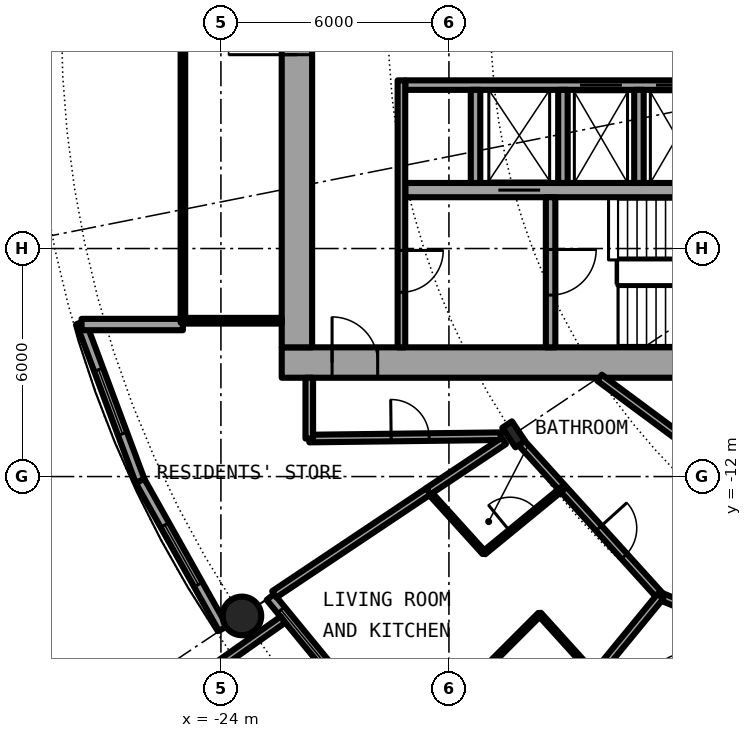
"""IFC4 building model, lengths in metres.
Left out: names, types, materials, properties, quantities, classifications, styles, units other than length and angle.
Written with IfcOpenShell. Run it as: python <this file> out.ifc"""

import sys

from ifc_helpers import new_model, si_unit, direction, frame, frame_2d, origin, origin_2d, place, context, subcontext, project, spatial, rectangle, hollow_circle, i_section, extrude, element, fill, save


model = new_model("IFC4")
c1 = context("Model", 3, precision=1e-05, world=origin(), true_north=direction((0.0, 1.0)))
c2 = subcontext(c1, "Body", "Model", "MODEL_VIEW")
j1 = project(units=[si_unit("LENGTHUNIT", "METRE"), si_unit("PLANEANGLEUNIT", "RADIAN")], contexts=[c1])
p1 = place(None, origin())
s1 = spatial("IfcSite", under=j1, at=p1, CompositionType="ELEMENT")
p2 = place(p1, origin())
s2 = spatial("IfcBuilding", under=s1, at=p2, CompositionType="ELEMENT")
p3 = place(p2, frame((0.0, 0.0, 47.2)))
s3 = spatial("IfcBuildingStorey", under=s2, at=p3, CompositionType="ELEMENT", Elevation=47.2)
p4 = place(p3, frame((-23.448, -15.667, 0.0), z_axis=(0.0, 0.0, 1.0), x_axis=(1.0, 0.0, 0.0)))
e1 = element("IfcColumn", 1, at=p4, inside=s3, PredefinedType="COLUMN", context=c2, shape_type="SweptSolid", body=[
    extrude(hollow_circle(Radius=0.508, WallThickness=0.05, at=origin_2d()), origin(), (0.0, 0.0, 1.0), 3.05),
])
p5 = place(p3, frame((-16.297, -10.889, 0.0), z_axis=(0.0, 0.0, 1.0), x_axis=(-0.831469612303, -0.55557023302, 0.0)))
e2 = element("IfcColumn", 2, at=p5, inside=s3, PredefinedType="COLUMN", context=c2, shape_type="SweptSolid", body=[
    extrude(i_section(OverallWidth=0.305, OverallDepth=0.62, WebThickness=0.021, FlangeThickness=0.04, FilletRadius=0.027, at=origin_2d()), origin(), (0.0, 0.0, 1.0), 3.05),
])
p6 = place(p3, frame((-22.699, -15.167, 0.0), z_axis=(0.0, 0.0, 1.0), x_axis=(0.634382322723, -0.773019449054, 0.0)))
e3 = element("IfcWall", 3, at=p6, inside=s3, PredefinedType="SOLIDWALL", context=c2, shape_type="SweptSolid", body=[
    extrude(rectangle(XDim=5.352, YDim=0.25, at=frame_2d((2.676, 0.0))), origin(), (0.0, 0.0, 1.0), 2.7),
])
p7 = place(p6, frame((0.441, 0.0, 0.3)))
e4 = element("IfcOpeningElement", 4, at=p7, cuts=e3, PredefinedType="OPENING", context=c2, shape_type="SweptSolid", body=[
    extrude(rectangle(XDim=1.8, YDim=2.1, at=frame_2d((0.9, 1.05))), frame((0.0, 0.135, 0.0), z_axis=(0.0, -1.0, 0.0), x_axis=(1.0, 0.0, 0.0)), (0.0, 0.0, 1.0), 0.27),
])
p8 = place(p6, frame((3.51, 0.0, 0.0)))
e5 = element("IfcOpeningElement", 5, at=p8, cuts=e3, PredefinedType="OPENING", context=c2, shape_type="SweptSolid", body=[
    extrude(rectangle(XDim=1.0, YDim=2.2, at=frame_2d((0.5, 1.1))), frame((0.0, 0.135, 0.0), z_axis=(0.0, -1.0, 0.0), x_axis=(1.0, 0.0, 0.0)), (0.0, 0.0, 1.0), 0.27),
])
p9 = place(p3, frame((-22.37, -15.765, -0.03), z_axis=(0.0, 0.0, 1.0), x_axis=(-0.817256123454, -0.576274612209, 0.0)))
e6 = element("IfcWall", 6, at=p9, inside=s3, PredefinedType="SOLIDWALL", context=c2, shape_type="SweptSolid", body=[
    extrude(rectangle(XDim=2.933, YDim=0.2, at=frame_2d((1.466, 0.0))), origin(), (0.0, 0.0, 1.0), 2.73),
])
p10 = place(p3, frame((-27.682, -7.945, 0.0), z_axis=(0.0, 0.0, 1.0), x_axis=(0.349247811493, -0.937030397675, 0.0)))
e7 = element("IfcWall", 7, at=p10, inside=s3, PredefinedType="SOLIDWALL", context=c2, shape_type="SweptSolid", body=[
    extrude(rectangle(XDim=4.452, YDim=0.25, at=frame_2d((2.226, 0.0))), origin(), (0.0, 0.0, 1.0), 2.7),
])
p11 = place(p10, frame((1.327, 0.0, 0.3)))
e8 = element("IfcOpeningElement", 8, at=p11, cuts=e7, PredefinedType="OPENING", context=c2, shape_type="SweptSolid", body=[
    extrude(rectangle(XDim=1.8, YDim=2.1, at=frame_2d((0.9, 1.05))), frame((0.0, 0.135, 0.0), z_axis=(0.0, -1.0, 0.0), x_axis=(1.0, 0.0, 0.0)), (0.0, 0.0, 1.0), 0.27),
])
p12 = place(p3, frame((-26.127, -12.117, 0.0), z_axis=(0.0, 0.0, 1.0), x_axis=(0.489696356642, -0.871893042919, 0.0)))
e9 = element("IfcWall", 9, at=p12, inside=s3, PredefinedType="SOLIDWALL", context=c2, shape_type="SweptSolid", body=[
    extrude(rectangle(XDim=4.454, YDim=0.25, at=frame_2d((2.227, 0.0))), origin(), (0.0, 0.0, 1.0), 2.7),
])
p13 = place(p12, frame((1.327, 0.0, 0.3)))
e10 = element("IfcOpeningElement", 10, at=p13, cuts=e9, PredefinedType="OPENING", context=c2, shape_type="SweptSolid", body=[
    extrude(rectangle(XDim=1.8, YDim=2.1, at=frame_2d((0.9, 1.05))), frame((0.0, 0.135, 0.0), z_axis=(0.0, -1.0, 0.0), x_axis=(1.0, 0.0, 0.0)), (0.0, 0.0, 1.0), 0.27),
])
p14 = place(p3, frame((-25.0, -8.0, 0.0), z_axis=(0.0, 0.0, 1.0), x_axis=(-1.0, 0.0, 0.0)))
e11 = element("IfcWall", 11, at=p14, inside=s3, PredefinedType="SOLIDWALL", context=c2, shape_type="SweptSolid", body=[
    extrude(rectangle(XDim=2.667, YDim=0.3, at=frame_2d((1.333, 0.0))), origin(), (0.0, 0.0, 1.0), 2.7),
])
p15 = place(p3, frame((-22.4, -9.0, 0.0), z_axis=(0.0, 0.0, 1.0), x_axis=(1.0, 0.0, 0.0)))
e12 = element("IfcWall", 12, at=p15, inside=s3, PredefinedType="SHEAR", context=c2, shape_type="SweptSolid", body=[
    extrude(rectangle(XDim=14.2, YDim=0.8, at=frame_2d((7.1, 0.0))), origin(), (0.0, 0.0, 1.0), 3.05),
])
p16 = place(p15, frame((1.325, 0.0, 0.0)))
e13 = element("IfcOpeningElement", 13, at=p16, cuts=e12, PredefinedType="OPENING", context=c2, shape_type="SweptSolid", body=[
    extrude(rectangle(XDim=1.2, YDim=2.3, at=frame_2d((0.6, 1.15))), frame((0.0, 0.41, 0.0), z_axis=(0.0, -1.0, 0.0), x_axis=(1.0, 0.0, 0.0)), (0.0, 0.0, 1.0), 0.82),
])
p17 = place(p3, frame((-22.0, -8.6, 0.0), z_axis=(0.0, 0.0, 1.0), x_axis=(0.0, 1.0, 0.0)))
e14 = element("IfcWall", 14, at=p17, inside=s3, PredefinedType="SHEAR", context=c2, shape_type="SweptSolid", body=[
    extrude(rectangle(XDim=17.2, YDim=0.8, at=frame_2d((8.6, 0.0))), origin(), (0.0, 0.0, 1.0), 3.05),
])
p18 = place(p17, frame((7.7, 0.0, 0.0)))
e15 = element("IfcOpeningElement", 15, at=p18, cuts=e14, PredefinedType="OPENING", context=c2, shape_type="SweptSolid", body=[
    extrude(rectangle(XDim=1.8, YDim=2.3, at=frame_2d((0.9, 1.15))), frame((0.0, 0.41, 0.0), z_axis=(0.0, -1.0, 0.0), x_axis=(1.0, 0.0, 0.0)), (0.0, 0.0, 1.0), 0.82),
])
p19 = place(p3, frame((-9.0, -1.7, 0.0), z_axis=(0.0, 0.0, 1.0), x_axis=(-1.0, 0.0, 0.0)))
e16 = element("IfcWall", 16, at=p19, inside=s3, PredefinedType="SHEAR", context=c2, shape_type="SweptSolid", body=[
    extrude(rectangle(XDim=10.15, YDim=0.25, at=frame_2d((5.075, 0.0))), origin(), (0.0, 0.0, 1.0), 3.05),
])
p20 = place(p19, frame((0.387, 0.0, 0.0)))
e17 = element("IfcOpeningElement", 17, at=p20, cuts=e16, PredefinedType="OPENING", context=c2, shape_type="SweptSolid", body=[
    extrude(rectangle(XDim=1.1, YDim=2.3, at=frame_2d((0.55, 1.15))), frame((0.0, 0.135, 0.0), z_axis=(0.0, -1.0, 0.0), x_axis=(1.0, 0.0, 0.0)), (0.0, 0.0, 1.0), 0.27),
])
p21 = place(p19, frame((2.45, 0.0, 0.0)))
e18 = element("IfcOpeningElement", 18, at=p21, cuts=e16, PredefinedType="OPENING", context=c2, shape_type="SweptSolid", body=[
    extrude(rectangle(XDim=1.1, YDim=2.3, at=frame_2d((0.55, 1.15))), frame((0.0, 0.135, 0.0), z_axis=(0.0, -1.0, 0.0), x_axis=(1.0, 0.0, 0.0)), (0.0, 0.0, 1.0), 0.27),
])
p22 = place(p19, frame((4.45, 0.0, 0.0)))
e19 = element("IfcOpeningElement", 19, at=p22, cuts=e16, PredefinedType="OPENING", context=c2, shape_type="SweptSolid", body=[
    extrude(rectangle(XDim=1.1, YDim=2.3, at=frame_2d((0.55, 1.15))), frame((0.0, 0.135, 0.0), z_axis=(0.0, -1.0, 0.0), x_axis=(1.0, 0.0, 0.0)), (0.0, 0.0, 1.0), 0.27),
])
p23 = place(p3, frame((-9.0, -4.462, 0.0), z_axis=(0.0, 0.0, 1.0), x_axis=(-1.0, 0.0, 0.0)))
e20 = element("IfcWall", 20, at=p23, inside=s3, PredefinedType="SHEAR", context=c2, shape_type="SweptSolid", body=[
    extrude(rectangle(XDim=10.15, YDim=0.375, at=frame_2d((5.075, 0.0))), origin(), (0.0, 0.0, 1.0), 3.05),
])
p24 = place(p23, frame((6.6, 0.0, 0.0)))
e21 = element("IfcOpeningElement", 21, at=p24, cuts=e20, PredefinedType="OPENING", context=c2, shape_type="SweptSolid", body=[
    extrude(rectangle(XDim=1.1, YDim=2.3, at=frame_2d((0.55, 1.15))), frame((0.0, 0.198, 0.0), z_axis=(0.0, -1.0, 0.0), x_axis=(1.0, 0.0, 0.0)), (0.0, 0.0, 1.0), 0.395),
])
p25 = place(p3, frame((-15.325, -4.65, 0.0), z_axis=(0.0, 0.0, 1.0), x_axis=(0.0, -1.0, 0.0)))
e22 = element("IfcWall", 22, at=p25, inside=s3, PredefinedType="SHEAR", context=c2, shape_type="SweptSolid", body=[
    extrude(rectangle(XDim=3.95, YDim=0.25, at=frame_2d((1.975, 0.0))), origin(), (0.0, 0.0, 1.0), 3.05),
])
p26 = place(p25, frame((1.375, 0.0, 0.0)))
e23 = element("IfcOpeningElement", 23, at=p26, cuts=e22, PredefinedType="OPENING", context=c2, shape_type="SweptSolid", body=[
    extrude(rectangle(XDim=1.2, YDim=2.3, at=frame_2d((0.6, 1.15))), frame((0.0, 0.135, 0.0), z_axis=(0.0, -1.0, 0.0), x_axis=(1.0, 0.0, 0.0)), (0.0, 0.0, 1.0), 0.27),
])
for number, where, z_axis, x_axis in (
    (24, (-15.0, -1.825, 0.0), (0.0, 0.0, 1.0), (0.0, -1.0, 0.0)),
    (25, (-17.3, -1.825, 0.0), (0.0, 0.0, 1.0), (0.0, -1.0, 0.0)),
):
    element("IfcWall", number, at=place(p3, frame(where, z_axis=z_axis, x_axis=x_axis)), inside=s3, PredefinedType="SOLIDWALL", context=c2, shape_type="SweptSolid", body=[
        extrude(rectangle(XDim=2.45, YDim=0.25, at=frame_2d((1.225, 0.0))), origin(), (0.0, 0.0, 1.0), 2.7),
    ])
p27 = place(p3, frame((-19.25, -1.575, 0.0), z_axis=(0.0, 0.0, 1.0), x_axis=(0.0, -1.0, 0.0)))
e26 = element("IfcWall", 26, at=p27, inside=s3, PredefinedType="SOLIDWALL", context=c2, shape_type="SweptSolid", body=[
    extrude(rectangle(XDim=7.025, YDim=0.2, at=frame_2d((3.513, 0.0))), origin(), (0.0, 0.0, 1.0), 2.7),
])
p28 = place(p27, frame((4.475, 0.0, 0.0)))
e27 = element("IfcOpeningElement", 27, at=p28, cuts=e26, PredefinedType="OPENING", context=c2, shape_type="SweptSolid", body=[
    extrude(rectangle(XDim=1.1, YDim=2.3, at=frame_2d((0.55, 1.15))), frame((0.0, 0.11, 0.0), z_axis=(0.0, -1.0, 0.0), x_axis=(1.0, 0.0, 0.0)), (0.0, 0.0, 1.0), 0.22),
])
p29 = place(p3, frame((-13.0, -1.825, 0.0), z_axis=(0.0, 0.0, 1.0), x_axis=(0.0, -1.0, 0.0)))
e28 = element("IfcWall", 28, at=p29, inside=s3, PredefinedType="SOLIDWALL", context=c2, shape_type="SweptSolid", body=[
    extrude(rectangle(XDim=2.45, YDim=0.25, at=frame_2d((1.225, 0.0))), origin(), (0.0, 0.0, 1.0), 2.7),
])
p30 = place(p3, frame((-22.4, -7.9, 0.0), z_axis=(0.0, 0.0, 1.0), x_axis=(-1.0, 0.0, 0.0)))
e29 = element("IfcWall", 29, at=p30, inside=s3, PredefinedType="PARTITIONING", context=c2, shape_type="SweptSolid", body=[
    extrude(rectangle(XDim=2.54, YDim=0.15, at=frame_2d((1.27, 0.0))), origin(), (0.0, 0.0, 1.0), 2.7),
])
p31 = place(p3, frame((-25.0, 7.95, 0.0), z_axis=(0.0, 0.0, 1.0), x_axis=(0.0, -1.0, 0.0)))
e30 = element("IfcWall", 30, at=p31, inside=s3, PredefinedType="PARTITIONING", context=c2, shape_type="SweptSolid", body=[
    extrude(rectangle(XDim=15.9, YDim=0.12, at=frame_2d((7.95, 0.0))), origin(), (0.0, 0.0, 1.0), 2.7),
])
p32 = place(p31, frame((0.95, 0.0, 0.1)))
e31 = element("IfcOpeningElement", 31, at=p32, cuts=e30, PredefinedType="OPENING", context=c2, shape_type="SweptSolid", body=[
    extrude(rectangle(XDim=14.0, YDim=2.35, at=frame_2d((7.0, 1.175))), frame((0.0, 0.07, 0.0), z_axis=(0.0, -1.0, 0.0), x_axis=(1.0, 0.0, 0.0)), (0.0, 0.0, 1.0), 0.14),
])
p33 = place(p3, frame((-18.542, -12.389, 0.0), z_axis=(0.0, 0.0, 1.0), x_axis=(0.671396556615, -0.741098282123, 0.0)))
e32 = element("IfcWall", 32, at=p33, inside=s3, PredefinedType="PARTITIONING", context=c2, shape_type="SweptSolid", body=[
    extrude(rectangle(XDim=2.182, YDim=0.1, at=frame_2d((1.091, 0.0))), origin(), (0.0, 0.0, 1.0), 2.7),
])
p34 = place(p3, frame((-15.617, -15.617, 0.0), z_axis=(0.0, 0.0, 1.0), x_axis=(0.671144831591, -0.741326254107, 0.0)))
e33 = element("IfcWall", 33, at=p34, inside=s3, PredefinedType="PARTITIONING", context=c2, shape_type="SweptSolid", body=[
    extrude(rectangle(XDim=2.181, YDim=0.1, at=frame_2d((1.091, 0.0))), origin(), (0.0, 0.0, 1.0), 2.7),
])
p35 = place(p3, frame((-16.193, -11.003, 0.0), z_axis=(0.0, 0.0, 1.0), x_axis=(0.671514934772, -0.740991020444, 0.0)))
e34 = element("IfcWall", 34, at=p35, inside=s3, PredefinedType="PARTITIONING", context=c2, shape_type="SweptSolid", body=[
    extrude(rectangle(XDim=5.598, YDim=0.2, at=frame_2d((2.799, 0.0))), origin(), (0.0, 0.0, 1.0), 2.38),
])
p36 = place(p35, frame((3.18, 0.0, 0.0)))
e35 = element("IfcOpeningElement", 35, at=p36, cuts=e34, PredefinedType="OPENING", context=c2, shape_type="SweptSolid", body=[
    extrude(rectangle(XDim=1.0, YDim=2.3, at=frame_2d((0.5, 1.15))), frame((0.0, 0.11, 0.0), z_axis=(0.0, -1.0, 0.0), x_axis=(1.0, 0.0, 0.0)), (0.0, 0.0, 1.0), 0.22),
])
p37 = place(p3, frame((-12.434, -15.151, 0.0), z_axis=(0.0, 0.0, 1.0), x_axis=(0.923888467236, -0.382661861319, 0.0)))
e36 = element("IfcWall", 36, at=p37, inside=s3, PredefinedType="PARTITIONING", context=c2, shape_type="SweptSolid", body=[
    extrude(rectangle(XDim=11.381, YDim=0.2, at=frame_2d((5.691, 0.0))), origin(), (0.0, 0.0, 1.0), 2.7),
])
p38 = place(p37, frame((3.292, 0.0, 0.0)))
e37 = element("IfcOpeningElement", 37, at=p38, cuts=e36, PredefinedType="OPENING", context=c2, shape_type="SweptSolid", body=[
    extrude(rectangle(XDim=1.0, YDim=2.3, at=frame_2d((0.5, 1.15))), frame((0.0, 0.11, 0.0), z_axis=(0.0, -1.0, 0.0), x_axis=(1.0, 0.0, 0.0)), (0.0, 0.0, 1.0), 0.22),
])
p39 = place(p3, frame((-14.037, -9.4, 0.0), z_axis=(0.0, 0.0, 1.0), x_axis=(0.803202106898, -0.595706618626, 0.0)))
e38 = element("IfcWall", 38, at=p39, inside=s3, PredefinedType="PARTITIONING", context=c2, shape_type="SweptSolid", body=[
    extrude(rectangle(XDim=11.368, YDim=0.2, at=frame_2d((5.684, 0.0))), origin(), (0.0, 0.0, 1.0), 2.7),
])
p40 = place(p39, frame((5.988, 0.0, 0.0)))
e39 = element("IfcOpeningElement", 39, at=p40, cuts=e38, PredefinedType="OPENING", context=c2, shape_type="SweptSolid", body=[
    extrude(rectangle(XDim=1.0, YDim=2.3, at=frame_2d((0.5, 1.15))), frame((0.0, 0.11, 0.0), z_axis=(0.0, -1.0, 0.0), x_axis=(1.0, 0.0, 0.0)), (0.0, 0.0, 1.0), 0.22),
])
p41 = place(p3, frame((-21.675, -11.0, 0.0), z_axis=(0.0, 0.0, 1.0), x_axis=(0.99992425795, 0.012307654658, 0.0)))
e40 = element("IfcWall", 40, at=p41, inside=s3, PredefinedType="PARTITIONING", context=c2, shape_type="SweptSolid", body=[
    extrude(rectangle(XDim=5.039, YDim=0.2, at=frame_2d((2.519, 0.0))), origin(), (0.0, 0.0, 1.0), 2.7),
])
p42 = place(p41, frame((2.155, 0.0, 0.0)))
e41 = element("IfcOpeningElement", 41, at=p42, cuts=e40, PredefinedType="OPENING", context=c2, shape_type="SweptSolid", body=[
    extrude(rectangle(XDim=1.0, YDim=2.3, at=frame_2d((0.5, 1.15))), frame((0.0, 0.11, 0.0), z_axis=(0.0, -1.0, 0.0), x_axis=(1.0, 0.0, 0.0)), (0.0, 0.0, 1.0), 0.22),
])
p43 = place(p3, frame((-18.544, -12.387, 0.0), z_axis=(0.0, 0.0, 1.0), x_axis=(0.832066006555, 0.554676627176, 0.0)))
e42 = element("IfcWall", 42, at=p43, inside=s3, PredefinedType="PARTITIONING", context=c2, shape_type="SweptSolid", body=[
    extrude(rectangle(XDim=2.39, YDim=0.2, at=frame_2d((1.195, 0.0))), origin(), (0.0, 0.0, 1.0), 2.7),
])
p44 = place(p3, frame((-22.595, -15.098, 0.0), z_axis=(0.0, 0.0, 1.0), x_axis=(0.831387096605, 0.55569370664, 0.0)))
e43 = element("IfcWall", 43, at=p44, inside=s3, PredefinedType="PARTITIONING", context=c2, shape_type="SweptSolid", body=[
    extrude(rectangle(XDim=4.875, YDim=0.2, at=frame_2d((2.438, 0.0))), origin(), (0.0, 0.0, 1.0), 2.7),
])
p45 = place(p3, frame((-19.21, -19.222, 0.0), z_axis=(0.0, 0.0, 1.0), x_axis=(0.706914880313, 0.707298629994, 0.0)))
e44 = element("IfcWall", 44, at=p45, inside=s3, PredefinedType="PARTITIONING", context=c2, shape_type="SweptSolid", body=[
    extrude(rectangle(XDim=5.09, YDim=0.1, at=frame_2d((2.545, 0.0))), origin(), (0.0, 0.0, 1.0), 2.7),
])
p46 = place(p45, frame((2.095, 0.0, 0.0)))
e45 = element("IfcOpeningElement", 45, at=p46, cuts=e44, PredefinedType="OPENING", context=c2, shape_type="SweptSolid", body=[
    extrude(rectangle(XDim=0.9, YDim=2.3, at=frame_2d((0.45, 1.15))), frame((0.0, 0.06, 0.0), z_axis=(0.0, -1.0, 0.0), x_axis=(1.0, 0.0, 0.0)), (0.0, 0.0, 1.0), 0.12),
])
p47 = place(p3, frame((-17.241, -21.006, 0.0), z_axis=(0.0, 0.0, 1.0), x_axis=(0.634381303318, 0.773020285633, 0.0)))
e46 = element("IfcWall", 46, at=p47, inside=s3, PredefinedType="PARTITIONING", context=c2, shape_type="SweptSolid", body=[
    extrude(rectangle(XDim=7.576, YDim=0.2, at=frame_2d((3.788, 0.0))), origin(), (0.0, 0.0, 1.0), 2.7),
])
p48 = place(p3, frame((-17.077, -14.006, 0.0), z_axis=(0.0, 0.0, 1.0), x_axis=(0.77319617123, 0.634166918717, 0.0)))
e47 = element("IfcWall", 47, at=p48, inside=s3, PredefinedType="PARTITIONING", context=c2, shape_type="SweptSolid", body=[
    extrude(rectangle(XDim=2.675, YDim=0.1, at=frame_2d((1.337, 0.0))), origin(), (0.0, 0.0, 1.0), 2.7),
])
p49 = place(p48, frame((0.887, 0.0, 0.0)))
e48 = element("IfcOpeningElement", 48, at=p49, cuts=e47, PredefinedType="OPENING", context=c2, shape_type="SweptSolid", body=[
    extrude(rectangle(XDim=0.9, YDim=2.3, at=frame_2d((0.45, 1.15))), frame((0.0, 0.06, 0.0), z_axis=(0.0, -1.0, 0.0), x_axis=(1.0, 0.0, 0.0)), (0.0, 0.0, 1.0), 0.12),
])
p50 = place(p3, frame((-12.153, -18.064, 0.0), z_axis=(0.0, 0.0, 1.0), x_axis=(0.558084773293, 0.829783939239, 0.0)))
e49 = element("IfcWall", 49, at=p50, inside=s3, PredefinedType="PARTITIONING", context=c2, shape_type="SweptSolid", body=[
    extrude(rectangle(XDim=1.862, YDim=0.1, at=frame_2d((0.931, 0.0))), origin(), (0.0, 0.0, 1.0), 2.7),
])
p51 = place(p50, frame((0.6, 0.0, 0.0)))
e50 = element("IfcOpeningElement", 50, at=p51, cuts=e49, PredefinedType="OPENING", context=c2, shape_type="SweptSolid", body=[
    extrude(rectangle(XDim=0.9, YDim=2.3, at=frame_2d((0.45, 1.15))), frame((0.0, 0.06, 0.0), z_axis=(0.0, -1.0, 0.0), x_axis=(1.0, 0.0, 0.0)), (0.0, 0.0, 1.0), 0.12),
])
p52 = place(p3, frame((-21.675, -11.0, 0.0), z_axis=(0.0, 0.0, 1.0), x_axis=(0.0, 1.0, 0.0)))
e51 = element("IfcWall", 51, at=p52, inside=s3, PredefinedType="PARTITIONING", context=c2, shape_type="SweptSolid", body=[
    extrude(rectangle(XDim=1.6, YDim=0.2, at=frame_2d((0.8, 0.0))), origin(), (0.0, 0.0, 1.0), 2.7),
])
p53 = place(p7, origin())
e52 = element("IfcWindow", 52, at=p53, inside=s3, PartitioningType="SINGLE_PANEL", PredefinedType="WINDOW", context=c2, shape_type="SweptSolid", body=[
    extrude(rectangle(XDim=1.8, YDim=2.1, at=frame_2d((0.9, 1.05))), frame((0.0, 0.03, 0.0), z_axis=(0.0, -1.0, 0.0), x_axis=(1.0, 0.0, 0.0)), (0.0, 0.0, 1.0), 0.06),
])
fill(e4, e52)
p54 = place(p11, origin())
e53 = element("IfcWindow", 53, at=p54, inside=s3, PartitioningType="SINGLE_PANEL", PredefinedType="WINDOW", context=c2, shape_type="SweptSolid", body=[
    extrude(rectangle(XDim=1.8, YDim=2.1, at=frame_2d((0.9, 1.05))), frame((0.0, 0.03, 0.0), z_axis=(0.0, -1.0, 0.0), x_axis=(1.0, 0.0, 0.0)), (0.0, 0.0, 1.0), 0.06),
])
fill(e8, e53)
p55 = place(p13, origin())
e54 = element("IfcWindow", 54, at=p55, inside=s3, PartitioningType="SINGLE_PANEL", PredefinedType="WINDOW", context=c2, shape_type="SweptSolid", body=[
    extrude(rectangle(XDim=1.8, YDim=2.1, at=frame_2d((0.9, 1.05))), frame((0.0, 0.03, 0.0), z_axis=(0.0, -1.0, 0.0), x_axis=(1.0, 0.0, 0.0)), (0.0, 0.0, 1.0), 0.06),
])
fill(e10, e54)
p56 = place(p21, origin())
e55 = element("IfcDoor", 55, at=p56, inside=s3, OperationType="DOUBLE_DOOR_SLIDING", PredefinedType="DOOR", context=c2, shape_type="SweptSolid", body=[
    extrude(rectangle(XDim=1.1, YDim=2.3, at=frame_2d((0.55, 1.15))), frame((0.0, 0.025, 0.0), z_axis=(0.0, -1.0, 0.0), x_axis=(1.0, 0.0, 0.0)), (0.0, 0.0, 1.0), 0.05),
])
fill(e18, e55)
p57 = place(p22, origin())
e56 = element("IfcDoor", 56, at=p57, inside=s3, OperationType="DOUBLE_DOOR_SLIDING", PredefinedType="DOOR", context=c2, shape_type="SweptSolid", body=[
    extrude(rectangle(XDim=1.1, YDim=2.3, at=frame_2d((0.55, 1.15))), frame((0.0, 0.025, 0.0), z_axis=(0.0, -1.0, 0.0), x_axis=(1.0, 0.0, 0.0)), (0.0, 0.0, 1.0), 0.05),
])
fill(e19, e56)
p58 = place(p24, origin())
e57 = element("IfcDoor", 57, at=p58, inside=s3, OperationType="DOUBLE_DOOR_SLIDING", PredefinedType="DOOR", context=c2, shape_type="SweptSolid", body=[
    extrude(rectangle(XDim=1.1, YDim=2.3, at=frame_2d((0.55, 1.15))), frame((0.0, 0.025, 0.0), z_axis=(0.0, -1.0, 0.0), x_axis=(1.0, 0.0, 0.0)), (0.0, 0.0, 1.0), 0.05),
])
fill(e21, e57)
p59 = place(p26, origin())
e58 = element("IfcDoor", 58, at=p59, inside=s3, OperationType="SINGLE_SWING_LEFT", PredefinedType="DOOR", context=c2, shape_type="SweptSolid", body=[
    extrude(rectangle(XDim=1.2, YDim=2.3, at=frame_2d((0.6, 1.15))), frame((0.0, 0.025, 0.0), z_axis=(0.0, -1.0, 0.0), x_axis=(1.0, 0.0, 0.0)), (0.0, 0.0, 1.0), 0.05),
])
fill(e23, e58)
p60 = place(p28, origin())
e59 = element("IfcDoor", 59, at=p60, inside=s3, OperationType="SINGLE_SWING_LEFT", PredefinedType="DOOR", context=c2, shape_type="SweptSolid", body=[
    extrude(rectangle(XDim=1.1, YDim=2.3, at=frame_2d((0.55, 1.15))), frame((0.0, 0.025, 0.0), z_axis=(0.0, -1.0, 0.0), x_axis=(1.0, 0.0, 0.0)), (0.0, 0.0, 1.0), 0.05),
])
fill(e27, e59)
p61 = place(p16, origin())
e60 = element("IfcDoor", 60, at=p61, inside=s3, OperationType="SINGLE_SWING_RIGHT", PredefinedType="DOOR", context=c2, shape_type="SweptSolid", body=[
    extrude(rectangle(XDim=1.2, YDim=2.3, at=frame_2d((0.6, 1.15))), frame((0.0, 0.025, 0.0), z_axis=(0.0, -1.0, 0.0), x_axis=(1.0, 0.0, 0.0)), (0.0, 0.0, 1.0), 0.05),
])
fill(e13, e60)
p62 = place(p18, origin())
e61 = element("IfcDoor", 61, at=p62, inside=s3, OperationType="SINGLE_SWING_LEFT", PredefinedType="DOOR", context=c2, shape_type="SweptSolid", body=[
    extrude(rectangle(XDim=1.8, YDim=2.3, at=frame_2d((0.9, 1.15))), frame((0.0, 0.025, 0.0), z_axis=(0.0, -1.0, 0.0), x_axis=(1.0, 0.0, 0.0)), (0.0, 0.0, 1.0), 0.05),
])
fill(e15, e61)
p63 = place(p32, origin())
e62 = element("IfcWindow", 62, at=p63, inside=s3, PartitioningType="SINGLE_PANEL", PredefinedType="WINDOW", context=c2, shape_type="SweptSolid", body=[
    extrude(rectangle(XDim=14.0, YDim=2.35, at=frame_2d((7.0, 1.175))), frame((0.0, 0.03, 0.0), z_axis=(0.0, -1.0, 0.0), x_axis=(1.0, 0.0, 0.0)), (0.0, 0.0, 1.0), 0.06),
])
fill(e31, e62)
p64 = place(p36, origin())
e63 = element("IfcDoor", 63, at=p64, inside=s3, OperationType="SINGLE_SWING_RIGHT", PredefinedType="DOOR", context=c2, shape_type="SweptSolid", body=[
    extrude(rectangle(XDim=1.0, YDim=2.3, at=frame_2d((0.5, 1.15))), frame((0.0, 0.025, 0.0), z_axis=(0.0, -1.0, 0.0), x_axis=(1.0, 0.0, 0.0)), (0.0, 0.0, 1.0), 0.05),
])
fill(e35, e63)
p65 = place(p49, origin())
e64 = element("IfcDoor", 64, at=p65, inside=s3, OperationType="SINGLE_SWING_LEFT", PredefinedType="DOOR", context=c2, shape_type="SweptSolid", body=[
    extrude(rectangle(XDim=0.9, YDim=2.3, at=frame_2d((0.45, 1.15))), frame((0.0, 0.025, 0.0), z_axis=(0.0, -1.0, 0.0), x_axis=(1.0, 0.0, 0.0)), (0.0, 0.0, 1.0), 0.05),
])
fill(e48, e64)
p66 = place(p42, origin())
e65 = element("IfcDoor", 65, at=p66, inside=s3, OperationType="SINGLE_SWING_RIGHT", PredefinedType="DOOR", context=c2, shape_type="SweptSolid", body=[
    extrude(rectangle(XDim=1.0, YDim=2.3, at=frame_2d((0.5, 1.15))), frame((0.0, 0.025, 0.0), z_axis=(0.0, -1.0, 0.0), x_axis=(1.0, 0.0, 0.0)), (0.0, 0.0, 1.0), 0.05),
])
fill(e41, e65)
save(model, sys.argv[1])
